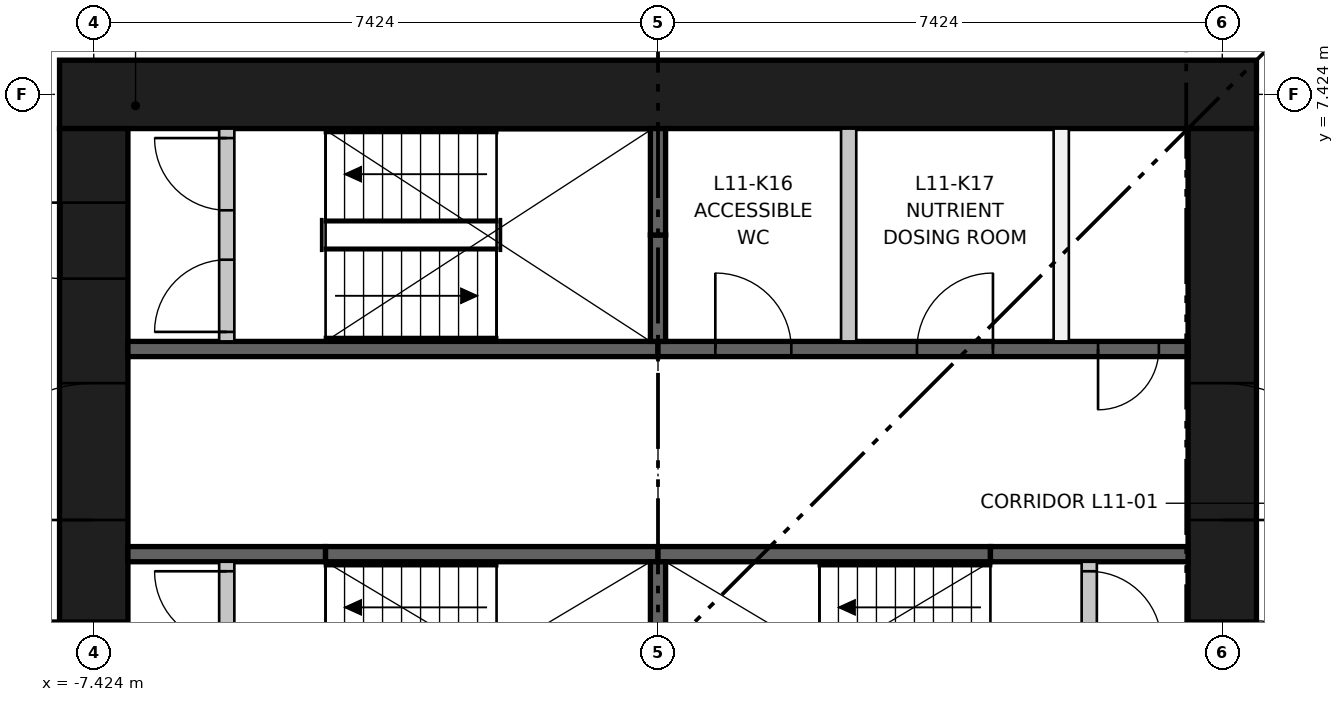
"""IFC4 building model, lengths in metres.
Left out: names, types, materials, properties, quantities, classifications, styles, units other than length and angle.
Written with IfcOpenShell. Run it as: python <this file> out.ifc"""

import sys

from ifc_helpers import new_model, si_unit, direction, frame, frame_2d, origin, place, context, subcontext, project, spatial, rectangle, extrude, element, fill, save


model = new_model("IFC4")
c1 = context("Model", 3, precision=1e-05, world=origin(), true_north=direction((0.0, 1.0)))
c2 = subcontext(c1, "Body", "Model", "MODEL_VIEW")
j1 = project(units=[si_unit("LENGTHUNIT", "METRE"), si_unit("PLANEANGLEUNIT", "RADIAN")], contexts=[c1])
p1 = place(None, origin())
s1 = spatial("IfcSite", under=j1, at=p1, CompositionType="ELEMENT")
p2 = place(p1, origin())
s2 = spatial("IfcBuilding", under=s1, at=p2, CompositionType="ELEMENT")
p3 = place(p2, frame((0.0, 0.0, 44.45)))
s3 = spatial("IfcBuildingStorey", under=s2, at=p3, CompositionType="ELEMENT", Elevation=44.45)
p4 = place(p3, frame((-7.874, 7.424, 0.0), z_axis=(0.0, 0.0, 1.0), x_axis=(1.0, 0.0, 0.0)))
e1 = element("IfcWall", 1, at=p4, inside=s3, PredefinedType="SHEAR", context=c2, shape_type="SweptSolid", body=[
    extrude(rectangle(XDim=15.748, YDim=0.9, at=frame_2d((7.874, 0.0))), origin(), (0.0, 0.0, 1.0), 3.65),
])
p5 = place(p3, frame((-7.424, -6.974, 0.0), z_axis=(0.0, 0.0, 1.0), x_axis=(0.0, 1.0, 0.0)))
e2 = element("IfcWall", 2, at=p5, inside=s3, PredefinedType="SHEAR", context=c2, shape_type="SweptSolid", body=[
    extrude(rectangle(XDim=13.948, YDim=0.9, at=frame_2d((6.974, 0.0))), origin(), (0.0, 0.0, 1.0), 3.65),
])
p6 = place(p5, frame((6.474, 0.0, 0.0)))
e3 = element("IfcOpeningElement", 3, at=p6, cuts=e2, PredefinedType="OPENING", context=c2, shape_type="SweptSolid", body=[
    extrude(rectangle(XDim=1.0, YDim=2.1, at=frame_2d((0.5, 1.05))), frame((0.0, 0.46, 0.0), z_axis=(0.0, -1.0, 0.0), x_axis=(1.0, 0.0, 0.0)), (0.0, 0.0, 1.0), 0.92),
])
p7 = place(p5, frame((3.35, 0.0, 0.0)))
e4 = element("IfcOpeningElement", 4, at=p7, cuts=e2, PredefinedType="OPENING", context=c2, shape_type="SweptSolid", body=[
    extrude(rectangle(XDim=1.8, YDim=2.1, at=frame_2d((0.9, 1.05))), frame((0.0, 0.46, 0.0), z_axis=(0.0, -1.0, 0.0), x_axis=(1.0, 0.0, 0.0)), (0.0, 0.0, 1.0), 0.92),
])
p8 = place(p5, frame((8.799, 0.0, 0.0)))
e5 = element("IfcOpeningElement", 5, at=p8, cuts=e2, PredefinedType="OPENING", context=c2, shape_type="SweptSolid", body=[
    extrude(rectangle(XDim=1.8, YDim=2.1, at=frame_2d((0.9, 1.05))), frame((0.0, 0.46, 0.0), z_axis=(0.0, -1.0, 0.0), x_axis=(1.0, 0.0, 0.0)), (0.0, 0.0, 1.0), 0.92),
])
p9 = place(p5, frame((11.974, 0.0, 0.0)))
e6 = element("IfcOpeningElement", 6, at=p9, cuts=e2, PredefinedType="OPENING", context=c2, shape_type="SweptSolid", body=[
    extrude(rectangle(XDim=1.0, YDim=2.1, at=frame_2d((0.5, 1.05))), frame((0.0, 0.46, 0.0), z_axis=(0.0, -1.0, 0.0), x_axis=(1.0, 0.0, 0.0)), (0.0, 0.0, 1.0), 0.92),
])
p10 = place(p3, frame((7.424, -6.974, 0.0), z_axis=(0.0, 0.0, 1.0), x_axis=(0.0, 1.0, 0.0)))
e7 = element("IfcWall", 7, at=p10, inside=s3, PredefinedType="SHEAR", context=c2, shape_type="SweptSolid", body=[
    extrude(rectangle(XDim=13.948, YDim=0.9, at=frame_2d((6.974, 0.0))), origin(), (0.0, 0.0, 1.0), 3.65),
])
p11 = place(p10, frame((6.474, 0.0, 0.0)))
e8 = element("IfcOpeningElement", 8, at=p11, cuts=e7, PredefinedType="OPENING", context=c2, shape_type="SweptSolid", body=[
    extrude(rectangle(XDim=1.0, YDim=2.1, at=frame_2d((0.5, 1.05))), frame((0.0, 0.46, 0.0), z_axis=(0.0, -1.0, 0.0), x_axis=(1.0, 0.0, 0.0)), (0.0, 0.0, 1.0), 0.92),
])
p12 = place(p10, frame((3.35, 0.0, 0.0)))
e9 = element("IfcOpeningElement", 9, at=p12, cuts=e7, PredefinedType="OPENING", context=c2, shape_type="SweptSolid", body=[
    extrude(rectangle(XDim=1.8, YDim=2.1, at=frame_2d((0.9, 1.05))), frame((0.0, 0.46, 0.0), z_axis=(0.0, -1.0, 0.0), x_axis=(1.0, 0.0, 0.0)), (0.0, 0.0, 1.0), 0.92),
])
p13 = place(p10, frame((8.799, 0.0, 0.0)))
e10 = element("IfcOpeningElement", 10, at=p13, cuts=e7, PredefinedType="OPENING", context=c2, shape_type="SweptSolid", body=[
    extrude(rectangle(XDim=1.8, YDim=2.1, at=frame_2d((0.9, 1.05))), frame((0.0, 0.46, 0.0), z_axis=(0.0, -1.0, 0.0), x_axis=(1.0, 0.0, 0.0)), (0.0, 0.0, 1.0), 0.92),
])
p14 = place(p3, frame((-6.974, 4.074, 0.0), z_axis=(0.0, 0.0, 1.0), x_axis=(1.0, 0.0, 0.0)))
e11 = element("IfcWall", 11, at=p14, inside=s3, PredefinedType="SHEAR", context=c2, shape_type="SweptSolid", body=[
    extrude(rectangle(XDim=6.974, YDim=0.2, at=frame_2d((3.487, 0.0))), origin(), (0.0, 0.0, 1.0), 3.3),
])
p15 = place(p3, frame((0.0, 4.074, 0.0), z_axis=(0.0, 0.0, 1.0), x_axis=(1.0, 0.0, 0.0)))
e12 = element("IfcWall", 12, at=p15, inside=s3, PredefinedType="SHEAR", context=c2, shape_type="SweptSolid", body=[
    extrude(rectangle(XDim=6.974, YDim=0.2, at=frame_2d((3.487, 0.0))), origin(), (0.0, 0.0, 1.0), 3.3),
])
p16 = place(p15, frame((0.754, 0.0, 0.0)))
e13 = element("IfcOpeningElement", 13, at=p16, cuts=e12, PredefinedType="OPENING", context=c2, shape_type="SweptSolid", body=[
    extrude(rectangle(XDim=1.0, YDim=2.1, at=frame_2d((0.5, 1.05))), frame((0.0, 0.11, 0.0), z_axis=(0.0, -1.0, 0.0), x_axis=(1.0, 0.0, 0.0)), (0.0, 0.0, 1.0), 0.22),
])
p17 = place(p15, frame((3.407, 0.0, 0.0)))
e14 = element("IfcOpeningElement", 14, at=p17, cuts=e12, PredefinedType="OPENING", context=c2, shape_type="SweptSolid", body=[
    extrude(rectangle(XDim=1.0, YDim=2.1, at=frame_2d((0.5, 1.05))), frame((0.0, 0.11, 0.0), z_axis=(0.0, -1.0, 0.0), x_axis=(1.0, 0.0, 0.0)), (0.0, 0.0, 1.0), 0.22),
])
p18 = place(p15, frame((5.79, 0.0, 0.0)))
e15 = element("IfcOpeningElement", 15, at=p18, cuts=e12, PredefinedType="OPENING", context=c2, shape_type="SweptSolid", body=[
    extrude(rectangle(XDim=0.8, YDim=2.1, at=frame_2d((0.4, 1.05))), frame((0.0, 0.11, 0.0), z_axis=(0.0, -1.0, 0.0), x_axis=(1.0, 0.0, 0.0)), (0.0, 0.0, 1.0), 0.22),
])
p19 = place(p3, frame((-6.974, 1.375, 0.0), z_axis=(0.0, 0.0, 1.0), x_axis=(1.0, 0.0, 0.0)))
e16 = element("IfcWall", 16, at=p19, inside=s3, PredefinedType="SHEAR", context=c2, shape_type="SweptSolid", body=[
    extrude(rectangle(XDim=2.6, YDim=0.2, at=frame_2d((1.3, 0.0))), origin(), (0.0, 0.0, 1.0), 3.3),
])
for number, where, z_axis, x_axis in (
    (17, (-4.374, 1.375, 0.0), (0.0, 0.0, 1.0), (1.0, 0.0, 0.0)),
    (18, (0.0, 1.375, 0.0), (0.0, 0.0, 1.0), (1.0, 0.0, 0.0)),
):
    element("IfcWall", number, at=place(p3, frame(where, z_axis=z_axis, x_axis=x_axis)), inside=s3, PredefinedType="SHEAR", context=c2, shape_type="SweptSolid", body=[
        extrude(rectangle(XDim=4.374, YDim=0.2, at=frame_2d((2.187, 0.0))), origin(), (0.0, 0.0, 1.0), 3.3),
    ])
p20 = place(p3, frame((4.374, 1.375, 0.0), z_axis=(0.0, 0.0, 1.0), x_axis=(1.0, 0.0, 0.0)))
e19 = element("IfcWall", 19, at=p20, inside=s3, PredefinedType="SHEAR", context=c2, shape_type="SweptSolid", body=[
    extrude(rectangle(XDim=2.6, YDim=0.2, at=frame_2d((1.3, 0.0))), origin(), (0.0, 0.0, 1.0), 3.3),
])
p21 = place(p3, frame((0.0, -1.275, 0.0), z_axis=(0.0, 0.0, 1.0), x_axis=(0.0, 1.0, 0.0)))
e20 = element("IfcWall", 20, at=p21, inside=s3, PredefinedType="SHEAR", context=c2, shape_type="SweptSolid", body=[
    extrude(rectangle(XDim=2.55, YDim=0.2, at=frame_2d((1.275, 0.0))), origin(), (0.0, 0.0, 1.0), 3.3),
])
p22 = place(p3, frame((0.0, 4.174, 0.0), z_axis=(0.0, 0.0, 1.0), x_axis=(0.0, 1.0, 0.0)))
e21 = element("IfcWall", 21, at=p22, inside=s3, PredefinedType="SHEAR", context=c2, shape_type="SweptSolid", body=[
    extrude(rectangle(XDim=1.4, YDim=0.2, at=frame_2d((0.7, 0.0))), origin(), (0.0, 0.0, 1.0), 3.3),
])
p23 = place(p3, frame((0.0, 5.574, 0.0), z_axis=(0.0, 0.0, 1.0), x_axis=(0.0, 1.0, 0.0)))
e22 = element("IfcWall", 22, at=p23, inside=s3, PredefinedType="SHEAR", context=c2, shape_type="SweptSolid", body=[
    extrude(rectangle(XDim=1.4, YDim=0.2, at=frame_2d((0.7, 0.0))), origin(), (0.0, 0.0, 1.0), 3.3),
])
for number, where, z_axis, x_axis in (
    (23, (2.509, 4.174, 0.0), (0.0, 0.0, 1.0), (0.0, 1.0, 0.0)),
    (24, (5.305, 4.174, 0.0), (0.0, 0.0, 1.0), (0.0, 1.0, 0.0)),
):
    element("IfcWall", number, at=place(p3, frame(where, z_axis=z_axis, x_axis=x_axis)), inside=s3, PredefinedType="PARTITIONING", context=c2, shape_type="SweptSolid", body=[
        extrude(rectangle(XDim=2.8, YDim=0.2, at=frame_2d((1.4, 0.0))), origin(), (0.0, 0.0, 1.0), 3.3),
    ])
p24 = place(p3, frame((-5.674, -1.275, 0.0), z_axis=(0.0, 0.0, 1.0), x_axis=(0.0, 1.0, 0.0)))
e25 = element("IfcWall", 25, at=p24, inside=s3, PredefinedType="PARTITIONING", context=c2, shape_type="SweptSolid", body=[
    extrude(rectangle(XDim=2.55, YDim=0.2, at=frame_2d((1.275, 0.0))), origin(), (0.0, 0.0, 1.0), 3.3),
])
p25 = place(p24, frame((0.125, 0.0, 0.0)))
e26 = element("IfcOpeningElement", 26, at=p25, cuts=e25, PredefinedType="OPENING", context=c2, shape_type="SweptSolid", body=[
    extrude(rectangle(XDim=0.95, YDim=2.1, at=frame_2d((0.475, 1.05))), frame((0.0, 0.11, 0.0), z_axis=(0.0, -1.0, 0.0), x_axis=(1.0, 0.0, 0.0)), (0.0, 0.0, 1.0), 0.22),
])
p26 = place(p24, frame((1.475, 0.0, 0.0)))
e27 = element("IfcOpeningElement", 27, at=p26, cuts=e25, PredefinedType="OPENING", context=c2, shape_type="SweptSolid", body=[
    extrude(rectangle(XDim=0.95, YDim=2.1, at=frame_2d((0.475, 1.05))), frame((0.0, 0.11, 0.0), z_axis=(0.0, -1.0, 0.0), x_axis=(1.0, 0.0, 0.0)), (0.0, 0.0, 1.0), 0.22),
])
p27 = place(p3, frame((5.674, -1.275, 0.0), z_axis=(0.0, 0.0, 1.0), x_axis=(0.0, 1.0, 0.0)))
e28 = element("IfcWall", 28, at=p27, inside=s3, PredefinedType="PARTITIONING", context=c2, shape_type="SweptSolid", body=[
    extrude(rectangle(XDim=2.55, YDim=0.2, at=frame_2d((1.275, 0.0))), origin(), (0.0, 0.0, 1.0), 3.3),
])
p28 = place(p27, frame((0.125, 0.0, 0.0)))
e29 = element("IfcOpeningElement", 29, at=p28, cuts=e28, PredefinedType="OPENING", context=c2, shape_type="SweptSolid", body=[
    extrude(rectangle(XDim=0.95, YDim=2.1, at=frame_2d((0.475, 1.05))), frame((0.0, 0.11, 0.0), z_axis=(0.0, -1.0, 0.0), x_axis=(1.0, 0.0, 0.0)), (0.0, 0.0, 1.0), 0.22),
])
p29 = place(p27, frame((1.475, 0.0, 0.0)))
e30 = element("IfcOpeningElement", 30, at=p29, cuts=e28, PredefinedType="OPENING", context=c2, shape_type="SweptSolid", body=[
    extrude(rectangle(XDim=0.95, YDim=2.1, at=frame_2d((0.475, 1.05))), frame((0.0, 0.11, 0.0), z_axis=(0.0, -1.0, 0.0), x_axis=(1.0, 0.0, 0.0)), (0.0, 0.0, 1.0), 0.22),
])
p30 = place(p3, frame((-5.674, 4.174, 0.0), z_axis=(0.0, 0.0, 1.0), x_axis=(0.0, 1.0, 0.0)))
e31 = element("IfcWall", 31, at=p30, inside=s3, PredefinedType="PARTITIONING", context=c2, shape_type="SweptSolid", body=[
    extrude(rectangle(XDim=2.8, YDim=0.2, at=frame_2d((1.4, 0.0))), origin(), (0.0, 0.0, 1.0), 3.3),
])
p31 = place(p30, frame((0.125, 0.0, 0.0)))
e32 = element("IfcOpeningElement", 32, at=p31, cuts=e31, PredefinedType="OPENING", context=c2, shape_type="SweptSolid", body=[
    extrude(rectangle(XDim=0.95, YDim=2.1, at=frame_2d((0.475, 1.05))), frame((0.0, 0.11, 0.0), z_axis=(0.0, -1.0, 0.0), x_axis=(1.0, 0.0, 0.0)), (0.0, 0.0, 1.0), 0.22),
])
p32 = place(p30, frame((1.725, 0.0, 0.0)))
e33 = element("IfcOpeningElement", 33, at=p32, cuts=e31, PredefinedType="OPENING", context=c2, shape_type="SweptSolid", body=[
    extrude(rectangle(XDim=0.95, YDim=2.1, at=frame_2d((0.475, 1.05))), frame((0.0, 0.11, 0.0), z_axis=(0.0, -1.0, 0.0), x_axis=(1.0, 0.0, 0.0)), (0.0, 0.0, 1.0), 0.22),
])
p33 = place(p26, origin())
e34 = element("IfcDoor", 34, at=p33, inside=s3, OperationType="SINGLE_SWING_RIGHT", PredefinedType="DOOR", context=c2, shape_type="SweptSolid", body=[
    extrude(rectangle(XDim=0.95, YDim=2.1, at=frame_2d((0.475, 1.05))), frame((0.0, 0.025, 0.0), z_axis=(0.0, -1.0, 0.0), x_axis=(1.0, 0.0, 0.0)), (0.0, 0.0, 1.0), 0.05),
])
fill(e27, e34)
p34 = place(p29, frame((0.95, 0.0, 0.0), z_axis=(0.0, 0.0, 1.0), x_axis=(-1.0, 0.0, 0.0)))
e35 = element("IfcDoor", 35, at=p34, inside=s3, OperationType="SINGLE_SWING_LEFT", PredefinedType="DOOR", context=c2, shape_type="SweptSolid", body=[
    extrude(rectangle(XDim=0.95, YDim=2.1, at=frame_2d((0.475, 1.05))), frame((0.0, 0.025, 0.0), z_axis=(0.0, -1.0, 0.0), x_axis=(1.0, 0.0, 0.0)), (0.0, 0.0, 1.0), 0.05),
])
fill(e30, e35)
p35 = place(p31, origin())
e36 = element("IfcDoor", 36, at=p35, inside=s3, OperationType="SINGLE_SWING_LEFT", PredefinedType="DOOR", context=c2, shape_type="SweptSolid", body=[
    extrude(rectangle(XDim=0.95, YDim=2.1, at=frame_2d((0.475, 1.05))), frame((0.0, 0.025, 0.0), z_axis=(0.0, -1.0, 0.0), x_axis=(1.0, 0.0, 0.0)), (0.0, 0.0, 1.0), 0.05),
])
fill(e32, e36)
p36 = place(p32, origin())
e37 = element("IfcDoor", 37, at=p36, inside=s3, OperationType="SINGLE_SWING_RIGHT", PredefinedType="DOOR", context=c2, shape_type="SweptSolid", body=[
    extrude(rectangle(XDim=0.95, YDim=2.1, at=frame_2d((0.475, 1.05))), frame((0.0, 0.025, 0.0), z_axis=(0.0, -1.0, 0.0), x_axis=(1.0, 0.0, 0.0)), (0.0, 0.0, 1.0), 0.05),
])
fill(e33, e37)
p37 = place(p16, origin())
e38 = element("IfcDoor", 38, at=p37, inside=s3, OperationType="SINGLE_SWING_LEFT", PredefinedType="DOOR", context=c2, shape_type="SweptSolid", body=[
    extrude(rectangle(XDim=1.0, YDim=2.1, at=frame_2d((0.5, 1.05))), frame((0.0, 0.025, 0.0), z_axis=(0.0, -1.0, 0.0), x_axis=(1.0, 0.0, 0.0)), (0.0, 0.0, 1.0), 0.05),
])
fill(e13, e38)
p38 = place(p17, origin())
e39 = element("IfcDoor", 39, at=p38, inside=s3, OperationType="SINGLE_SWING_RIGHT", PredefinedType="DOOR", context=c2, shape_type="SweptSolid", body=[
    extrude(rectangle(XDim=1.0, YDim=2.1, at=frame_2d((0.5, 1.05))), frame((0.0, 0.025, 0.0), z_axis=(0.0, -1.0, 0.0), x_axis=(1.0, 0.0, 0.0)), (0.0, 0.0, 1.0), 0.05),
])
fill(e14, e39)
p39 = place(p18, frame((0.8, 0.0, 0.0), z_axis=(0.0, 0.0, 1.0), x_axis=(-1.0, 0.0, 0.0)))
e40 = element("IfcDoor", 40, at=p39, inside=s3, OperationType="SINGLE_SWING_LEFT", PredefinedType="DOOR", context=c2, shape_type="SweptSolid", body=[
    extrude(rectangle(XDim=0.8, YDim=2.1, at=frame_2d((0.4, 1.05))), frame((0.0, 0.025, 0.0), z_axis=(0.0, -1.0, 0.0), x_axis=(1.0, 0.0, 0.0)), (0.0, 0.0, 1.0), 0.05),
])
fill(e15, e40)
p40 = place(p6, origin())
e41 = element("IfcDoor", 41, at=p40, inside=s3, OperationType="SINGLE_SWING_RIGHT", PredefinedType="DOOR", context=c2, shape_type="SweptSolid", body=[
    extrude(rectangle(XDim=1.0, YDim=2.1, at=frame_2d((0.5, 1.05))), frame((0.0, 0.45, 0.0), z_axis=(0.0, -1.0, 0.0), x_axis=(1.0, 0.0, 0.0)), (0.0, 0.0, 1.0), 0.05),
])
fill(e3, e41)
p41 = place(p8, origin())
e42 = element("IfcDoor", 42, at=p41, inside=s3, OperationType="DOUBLE_DOOR_SINGLE_SWING", PredefinedType="DOOR", context=c2, shape_type="SweptSolid", body=[
    extrude(rectangle(XDim=1.8, YDim=2.1, at=frame_2d((0.9, 1.05))), frame((0.0, 0.025, 0.0), z_axis=(0.0, -1.0, 0.0), x_axis=(1.0, 0.0, 0.0)), (0.0, 0.0, 1.0), 0.05),
])
fill(e5, e42)
p42 = place(p9, origin())
e43 = element("IfcDoor", 43, at=p42, inside=s3, OperationType="SINGLE_SWING_RIGHT", PredefinedType="DOOR", context=c2, shape_type="SweptSolid", body=[
    extrude(rectangle(XDim=1.0, YDim=2.1, at=frame_2d((0.5, 1.05))), frame((0.0, 0.45, 0.0), z_axis=(0.0, -1.0, 0.0), x_axis=(1.0, 0.0, 0.0)), (0.0, 0.0, 1.0), 0.05),
])
fill(e6, e43)
p43 = place(p11, frame((1.0, 0.0, 0.0), z_axis=(0.0, 0.0, 1.0), x_axis=(-1.0, 0.0, 0.0)))
e44 = element("IfcDoor", 44, at=p43, inside=s3, OperationType="SINGLE_SWING_LEFT", PredefinedType="DOOR", context=c2, shape_type="SweptSolid", body=[
    extrude(rectangle(XDim=1.0, YDim=2.1, at=frame_2d((0.5, 1.05))), frame((0.0, 0.45, 0.0), z_axis=(0.0, -1.0, 0.0), x_axis=(1.0, 0.0, 0.0)), (0.0, 0.0, 1.0), 0.05),
])
fill(e8, e44)
p44 = place(p13, frame((1.8, 0.0, 0.0), z_axis=(0.0, 0.0, 1.0), x_axis=(-1.0, 0.0, 0.0)))
e45 = element("IfcDoor", 45, at=p44, inside=s3, OperationType="DOUBLE_DOOR_SINGLE_SWING", PredefinedType="DOOR", context=c2, shape_type="SweptSolid", body=[
    extrude(rectangle(XDim=1.8, YDim=2.1, at=frame_2d((0.9, 1.05))), frame((0.0, 0.025, 0.0), z_axis=(0.0, -1.0, 0.0), x_axis=(1.0, 0.0, 0.0)), (0.0, 0.0, 1.0), 0.05),
])
fill(e10, e45)
save(model, sys.argv[1])
